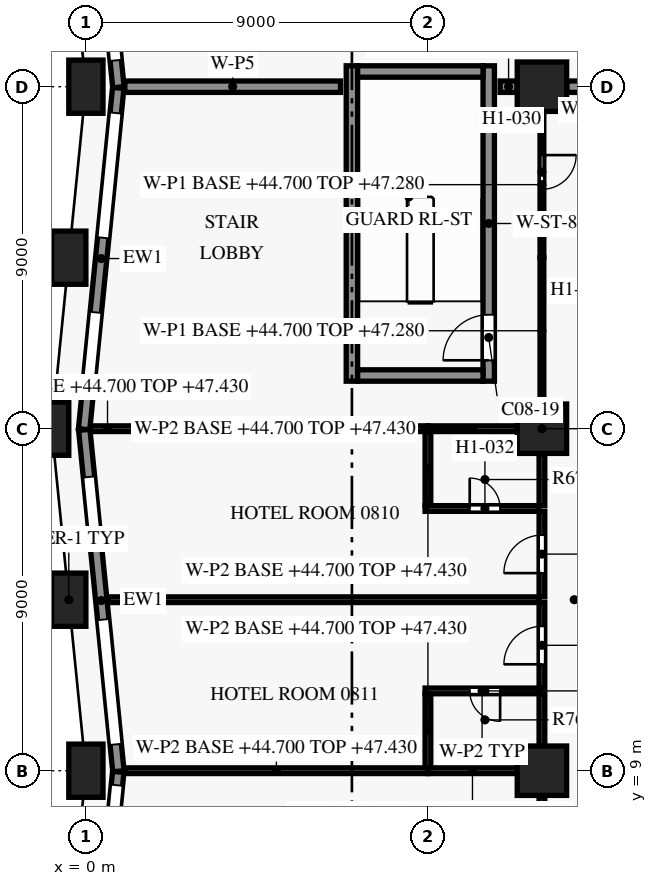
"""IFC4 building model, lengths in metres.
Left out: names, types, materials, properties, quantities, classifications, styles, units other than length and angle.
Written with IfcOpenShell. Run it as: python <this file> out.ifc"""

import sys

from ifc_helpers import new_model, si_unit, direction, frame, frame_2d, origin, origin_2d, place, context, subcontext, project, spatial, rectangle, extrude, element, fill, save


model = new_model("IFC4")
c1 = context("Model", 3, precision=1e-05, world=origin(), true_north=direction((0.0, 1.0)))
c2 = subcontext(c1, "Body", "Model", "MODEL_VIEW")
j1 = project(units=[si_unit("LENGTHUNIT", "METRE"), si_unit("PLANEANGLEUNIT", "RADIAN")], contexts=[c1])
p1 = place(None, origin())
s1 = spatial("IfcSite", under=j1, at=p1, CompositionType="ELEMENT")
p2 = place(p1, origin())
s2 = spatial("IfcBuilding", under=s1, at=p2, CompositionType="ELEMENT")
p3 = place(p2, frame((0.0, 0.0, 44.7)))
s3 = spatial("IfcBuildingStorey", under=s2, at=p3, CompositionType="ELEMENT", Elevation=44.7)
for number, where, z_axis, x_axis in (
    (1, (0.0, 27.0, 0.0), (0.0, 0.0, 1.0), (0.0, -1.0, 0.0)),
    (2, (-0.45, 22.5, 0.0), (0.0, 0.0, 1.0), (-0.1, -0.995, 0.0)),
    (3, (-0.9, 18.0, 0.0), (0.0, 0.0, 1.0), (0.0, -1.0, 0.0)),
    (4, (-0.45, 13.5, 0.0), (0.0, 0.0, 1.0), (0.1, -0.995, 0.0)),
    (5, (0.0, 9.0, 0.0), (0.0, 0.0, 1.0), (0.0, -1.0, 0.0)),
):
    element("IfcColumn", number, at=place(p3, frame(where, z_axis=z_axis, x_axis=x_axis)), inside=s3, PredefinedType="COLUMN", context=c2, shape_type="SweptSolid", body=[
        extrude(rectangle(XDim=0.9, YDim=1.4, at=origin_2d()), origin(), (0.0, 0.0, 1.0), 3.6),
    ])
for number, where, z_axis, x_axis in (
    (6, (12.0, 9.0, 0.0), (0.0, 0.0, 1.0), (1.0, 0.0, 0.0)),
    (7, (12.0, 18.0, 0.0), (0.0, 0.0, 1.0), (1.0, 0.0, 0.0)),
    (8, (12.0, 27.0, 0.0), (0.0, 0.0, 1.0), (1.0, 0.0, 0.0)),
):
    element("IfcColumn", number, at=place(p3, frame(where, z_axis=z_axis, x_axis=x_axis)), inside=s3, PredefinedType="COLUMN", context=c2, shape_type="SweptSolid", body=[
        extrude(rectangle(XDim=1.3, YDim=1.3, at=origin_2d()), origin(), (0.0, 0.0, 1.0), 3.6),
    ])
p4 = place(p3, frame((0.856, 26.985, 0.0), z_axis=(0.0, 0.0, 1.0), x_axis=(-0.099503719021, 0.99503719021, 0.0)))
e9 = element("IfcWall", 9, at=p4, inside=s3, PredefinedType="SOLIDWALL", context=c2, shape_type="SweptSolid", body=[
    extrude(rectangle(XDim=8.995, YDim=0.3, at=frame_2d((4.498, 0.0))), origin(), (0.0, 0.0, 1.0), 2.95),
])
p5 = place(p4, frame((0.711, 0.0, 0.15)))
e10 = element("IfcOpeningElement", 10, at=p5, cuts=e9, PredefinedType="OPENING", context=c2, shape_type="SweptSolid", body=[
    extrude(rectangle(XDim=3.3, YDim=2.4, at=frame_2d((1.65, 1.2))), frame((0.0, 0.16, 0.0), z_axis=(0.0, -1.0, 0.0), x_axis=(1.0, 0.0, 0.0)), (0.0, 0.0, 1.0), 0.32),
])
p6 = place(p4, frame((5.984, 0.0, 0.75)))
e11 = element("IfcOpeningElement", 11, at=p6, cuts=e9, PredefinedType="OPENING", context=c2, shape_type="SweptSolid", body=[
    extrude(rectangle(XDim=1.8, YDim=1.8, at=frame_2d((0.9, 0.9))), frame((0.0, 0.16, 0.0), z_axis=(0.0, -1.0, 0.0), x_axis=(1.0, 0.0, 0.0)), (0.0, 0.0, 1.0), 0.32),
])
p7 = place(p3, frame((-0.047, 17.985, 0.0), z_axis=(0.0, 0.0, 1.0), x_axis=(0.099522457379, 0.995035316196, 0.0)))
e12 = element("IfcWall", 12, at=p7, inside=s3, PredefinedType="SOLIDWALL", context=c2, shape_type="SweptSolid", body=[
    extrude(rectangle(XDim=9.03, YDim=0.3, at=frame_2d((4.515, 0.0))), origin(), (0.0, 0.0, 1.0), 2.95),
])
p8 = place(p7, frame((1.291, 0.0, 0.75)))
e13 = element("IfcOpeningElement", 13, at=p8, cuts=e12, PredefinedType="OPENING", context=c2, shape_type="SweptSolid", body=[
    extrude(rectangle(XDim=1.8, YDim=1.8, at=frame_2d((0.9, 0.9))), frame((0.0, 0.16, 0.0), z_axis=(0.0, -1.0, 0.0), x_axis=(1.0, 0.0, 0.0)), (0.0, 0.0, 1.0), 0.32),
])
p9 = place(p7, frame((5.064, 0.0, 0.15)))
e14 = element("IfcOpeningElement", 14, at=p9, cuts=e12, PredefinedType="OPENING", context=c2, shape_type="SweptSolid", body=[
    extrude(rectangle(XDim=3.3, YDim=2.4, at=frame_2d((1.65, 1.2))), frame((0.0, 0.16, 0.0), z_axis=(0.0, -1.0, 0.0), x_axis=(1.0, 0.0, 0.0)), (0.0, 0.0, 1.0), 0.32),
])
p10 = place(p3, frame((0.856, 8.985, 0.0), z_axis=(0.0, 0.0, 1.0), x_axis=(-0.099495688264, 0.995037993253, 0.0)))
e15 = element("IfcWall", 15, at=p10, inside=s3, PredefinedType="SOLIDWALL", context=c2, shape_type="SweptSolid", body=[
    extrude(rectangle(XDim=9.03, YDim=0.3, at=frame_2d((4.515, 0.0))), origin(), (0.0, 0.0, 1.0), 2.95),
])
p11 = place(p10, frame((0.711, 0.0, 0.15)))
e16 = element("IfcOpeningElement", 16, at=p11, cuts=e15, PredefinedType="OPENING", context=c2, shape_type="SweptSolid", body=[
    extrude(rectangle(XDim=3.3, YDim=2.4, at=frame_2d((1.65, 1.2))), frame((0.0, 0.16, 0.0), z_axis=(0.0, -1.0, 0.0), x_axis=(1.0, 0.0, 0.0)), (0.0, 0.0, 1.0), 0.32),
])
p12 = place(p10, frame((5.984, 0.0, 0.75)))
e17 = element("IfcOpeningElement", 17, at=p12, cuts=e15, PredefinedType="OPENING", context=c2, shape_type="SweptSolid", body=[
    extrude(rectangle(XDim=1.8, YDim=1.8, at=frame_2d((0.9, 0.9))), frame((0.0, 0.16, 0.0), z_axis=(0.0, -1.0, 0.0), x_axis=(1.0, 0.0, 0.0)), (0.0, 0.0, 1.0), 0.32),
])
p13 = place(p3, frame((0.473, 5.185, 0.0), z_axis=(0.0, 0.0, 1.0), x_axis=(0.099541845169, 0.995033376857, 0.0)))
e18 = element("IfcWall", 18, at=p13, inside=s3, PredefinedType="SOLIDWALL", context=c2, shape_type="SweptSolid", body=[
    extrude(rectangle(XDim=3.804, YDim=0.3, at=frame_2d((1.902, 0.0))), origin(), (0.0, 0.0, 1.0), 2.95),
])
p14 = place(p13, frame((0.15, 0.0, 0.15)))
e19 = element("IfcOpeningElement", 19, at=p14, cuts=e18, PredefinedType="OPENING", context=c2, shape_type="SweptSolid", body=[
    extrude(rectangle(XDim=3.3, YDim=2.4, at=frame_2d((1.65, 1.2))), frame((0.0, 0.16, 0.0), z_axis=(0.0, -1.0, 0.0), x_axis=(1.0, 0.0, 0.0)), (0.0, 0.0, 1.0), 0.32),
])
for number, where, z_axis, x_axis in (
    (20, (7.15, 19.4, 0.0), (0.0, 0.0, 1.0), (1.0, 0.0, 0.0)),
    (21, (7.15, 27.4, 0.0), (0.0, 0.0, 1.0), (1.0, 0.0, 0.0)),
):
    element("IfcWall", number, at=place(p3, frame(where, z_axis=z_axis, x_axis=x_axis)), inside=s3, PredefinedType="SHEAR", context=c2, shape_type="SweptSolid", body=[
        extrude(rectangle(XDim=3.3, YDim=0.3, at=frame_2d((1.65, 0.0))), origin(), (0.0, 0.0, 1.0), 3.3),
    ])
p15 = place(p3, frame((7.0, 19.25, 0.0), z_axis=(0.0, 0.0, 1.0), x_axis=(0.0, 1.0, 0.0)))
e22 = element("IfcWall", 22, at=p15, inside=s3, PredefinedType="SHEAR", context=c2, shape_type="SweptSolid", body=[
    extrude(rectangle(XDim=8.3, YDim=0.3, at=frame_2d((4.15, 0.0))), origin(), (0.0, 0.0, 1.0), 3.3),
])
p16 = place(p3, frame((10.6, 19.25, 0.0), z_axis=(0.0, 0.0, 1.0), x_axis=(0.0, 1.0, 0.0)))
e23 = element("IfcWall", 23, at=p16, inside=s3, PredefinedType="SHEAR", context=c2, shape_type="SweptSolid", body=[
    extrude(rectangle(XDim=8.3, YDim=0.3, at=frame_2d((4.15, 0.0))), origin(), (0.0, 0.0, 1.0), 3.3),
])
p17 = place(p16, frame((0.55, 0.0, 0.0)))
e24 = element("IfcOpeningElement", 24, at=p17, cuts=e23, PredefinedType="OPENING", context=c2, shape_type="SweptSolid", body=[
    extrude(rectangle(XDim=1.2, YDim=2.2, at=frame_2d((0.6, 1.1))), frame((0.0, 0.16, 0.0), z_axis=(0.0, -1.0, 0.0), x_axis=(1.0, 0.0, 0.0)), (0.0, 0.0, 1.0), 0.32),
])
p18 = place(p3, frame((12.0, 7.275, 0.0), z_axis=(0.0, 0.0, 1.0), x_axis=(0.0, 1.0, 0.0)))
e25 = element("IfcWall", 25, at=p18, inside=s3, PredefinedType="PARTITIONING", context=c2, shape_type="SweptSolid", body=[
    extrude(rectangle(XDim=1.07, YDim=0.15, at=frame_2d((0.535, 0.0))), origin(), (0.0, 0.0, 1.0), 2.58),
])
p19 = place(p3, frame((9.0, 9.0, 0.0), z_axis=(0.0, 0.0, 1.0), x_axis=(-1.0, 0.0, 0.0)))
e26 = element("IfcWall", 26, at=p19, inside=s3, PredefinedType="PARTITIONING", context=c2, shape_type="SweptSolid", body=[
    extrude(rectangle(XDim=7.975, YDim=0.15, at=frame_2d((3.988, 0.0))), origin(), (0.0, 0.0, 1.0), 2.73),
])
p20 = place(p3, frame((11.345, 9.0, 0.0), z_axis=(0.0, 0.0, 1.0), x_axis=(-1.0, 0.0, 0.0)))
e27 = element("IfcWall", 27, at=p20, inside=s3, PredefinedType="PARTITIONING", context=c2, shape_type="SweptSolid", body=[
    extrude(rectangle(XDim=2.345, YDim=0.15, at=frame_2d((1.172, 0.0))), origin(), (0.0, 0.0, 1.0), 2.73),
])
p21 = place(p3, frame((12.0, 9.655, 0.0), z_axis=(0.0, 0.0, 1.0), x_axis=(0.0, 1.0, 0.0)))
e28 = element("IfcWall", 28, at=p21, inside=s3, PredefinedType="PARTITIONING", context=c2, shape_type="SweptSolid", body=[
    extrude(rectangle(XDim=1.37, YDim=0.15, at=frame_2d((0.685, 0.0))), origin(), (0.0, 0.0, 1.0), 2.58),
])
p22 = place(p3, frame((9.0, 11.025, 0.0), z_axis=(0.0, 0.0, 1.0), x_axis=(0.0, -1.0, 0.0)))
e29 = element("IfcWall", 29, at=p22, inside=s3, PredefinedType="PARTITIONING", context=c2, shape_type="SweptSolid", body=[
    extrude(rectangle(XDim=1.95, YDim=0.15, at=frame_2d((0.975, 0.0))), origin(), (0.0, 0.0, 1.0), 2.73),
])
p23 = place(p3, frame((11.925, 11.1, 0.0), z_axis=(0.0, 0.0, 1.0), x_axis=(-1.0, 0.0, 0.0)))
e30 = element("IfcWall", 30, at=p23, inside=s3, PredefinedType="PARTITIONING", context=c2, shape_type="SweptSolid", body=[
    extrude(rectangle(XDim=3.0, YDim=0.15, at=frame_2d((1.5, 0.0))), origin(), (0.0, 0.0, 1.0), 2.58),
])
p24 = place(p23, frame((1.025, 0.0, 0.0)))
e31 = element("IfcOpeningElement", 31, at=p24, cuts=e30, PredefinedType="OPENING", context=c2, shape_type="SweptSolid", body=[
    extrude(rectangle(XDim=0.8, YDim=2.1, at=frame_2d((0.4, 1.05))), frame((0.0, 0.085, 0.0), z_axis=(0.0, -1.0, 0.0), x_axis=(1.0, 0.0, 0.0)), (0.0, 0.0, 1.0), 0.17),
])
p25 = place(p3, frame((12.0, 11.175, 0.0), z_axis=(0.0, 0.0, 1.0), x_axis=(0.0, 1.0, 0.0)))
e32 = element("IfcWall", 32, at=p25, inside=s3, PredefinedType="PARTITIONING", context=c2, shape_type="SweptSolid", body=[
    extrude(rectangle(XDim=2.25, YDim=0.15, at=frame_2d((1.125, 0.0))), origin(), (0.0, 0.0, 1.0), 2.58),
])
p26 = place(p25, frame((0.625, 0.0, 0.0)))
e33 = element("IfcOpeningElement", 33, at=p26, cuts=e32, PredefinedType="OPENING", context=c2, shape_type="SweptSolid", body=[
    extrude(rectangle(XDim=1.0, YDim=2.1, at=frame_2d((0.5, 1.05))), frame((0.0, 0.085, 0.0), z_axis=(0.0, -1.0, 0.0), x_axis=(1.0, 0.0, 0.0)), (0.0, 0.0, 1.0), 0.17),
])
p27 = place(p3, frame((11.925, 13.5, 0.0), z_axis=(0.0, 0.0, 1.0), x_axis=(-1.0, 0.0, 0.0)))
e34 = element("IfcWall", 34, at=p27, inside=s3, PredefinedType="PARTITIONING", context=c2, shape_type="SweptSolid", body=[
    extrude(rectangle(XDim=11.35, YDim=0.15, at=frame_2d((5.675, 0.0))), origin(), (0.0, 0.0, 1.0), 2.58),
])
p28 = place(p3, frame((12.0, 13.575, 0.0), z_axis=(0.0, 0.0, 1.0), x_axis=(0.0, 1.0, 0.0)))
e35 = element("IfcWall", 35, at=p28, inside=s3, PredefinedType="PARTITIONING", context=c2, shape_type="SweptSolid", body=[
    extrude(rectangle(XDim=2.25, YDim=0.15, at=frame_2d((1.125, 0.0))), origin(), (0.0, 0.0, 1.0), 2.58),
])
p29 = place(p28, frame((0.625, 0.0, 0.0)))
e36 = element("IfcOpeningElement", 36, at=p29, cuts=e35, PredefinedType="OPENING", context=c2, shape_type="SweptSolid", body=[
    extrude(rectangle(XDim=1.0, YDim=2.1, at=frame_2d((0.5, 1.05))), frame((0.0, 0.085, 0.0), z_axis=(0.0, -1.0, 0.0), x_axis=(1.0, 0.0, 0.0)), (0.0, 0.0, 1.0), 0.17),
])
p30 = place(p3, frame((8.925, 15.9, 0.0), z_axis=(0.0, 0.0, 1.0), x_axis=(1.0, 0.0, 0.0)))
e37 = element("IfcWall", 37, at=p30, inside=s3, PredefinedType="PARTITIONING", context=c2, shape_type="SweptSolid", body=[
    extrude(rectangle(XDim=3.0, YDim=0.15, at=frame_2d((1.5, 0.0))), origin(), (0.0, 0.0, 1.0), 2.58),
])
p31 = place(p30, frame((1.175, 0.0, 0.0)))
e38 = element("IfcOpeningElement", 38, at=p31, cuts=e37, PredefinedType="OPENING", context=c2, shape_type="SweptSolid", body=[
    extrude(rectangle(XDim=0.8, YDim=2.1, at=frame_2d((0.4, 1.05))), frame((0.0, 0.085, 0.0), z_axis=(0.0, -1.0, 0.0), x_axis=(1.0, 0.0, 0.0)), (0.0, 0.0, 1.0), 0.17),
])
p32 = place(p3, frame((12.0, 15.975, 0.0), z_axis=(0.0, 0.0, 1.0), x_axis=(0.0, 1.0, 0.0)))
e39 = element("IfcWall", 39, at=p32, inside=s3, PredefinedType="PARTITIONING", context=c2, shape_type="SweptSolid", body=[
    extrude(rectangle(XDim=1.37, YDim=0.15, at=frame_2d((0.685, 0.0))), origin(), (0.0, 0.0, 1.0), 2.58),
])
p33 = place(p3, frame((9.0, 17.925, 0.0), z_axis=(0.0, 0.0, 1.0), x_axis=(0.0, -1.0, 0.0)))
e40 = element("IfcWall", 40, at=p33, inside=s3, PredefinedType="PARTITIONING", context=c2, shape_type="SweptSolid", body=[
    extrude(rectangle(XDim=1.95, YDim=0.15, at=frame_2d((0.975, 0.0))), origin(), (0.0, 0.0, 1.0), 2.73),
])
p34 = place(p3, frame((9.0, 18.0, 0.0), z_axis=(0.0, 0.0, 1.0), x_axis=(-1.0, 0.0, 0.0)))
e41 = element("IfcWall", 41, at=p34, inside=s3, PredefinedType="PARTITIONING", context=c2, shape_type="SweptSolid", body=[
    extrude(rectangle(XDim=8.875, YDim=0.15, at=frame_2d((4.438, 0.0))), origin(), (0.0, 0.0, 1.0), 2.73),
])
p35 = place(p3, frame((11.345, 18.0, 0.0), z_axis=(0.0, 0.0, 1.0), x_axis=(-1.0, 0.0, 0.0)))
e42 = element("IfcWall", 42, at=p35, inside=s3, PredefinedType="PARTITIONING", context=c2, shape_type="SweptSolid", body=[
    extrude(rectangle(XDim=2.345, YDim=0.15, at=frame_2d((1.172, 0.0))), origin(), (0.0, 0.0, 1.0), 2.73),
])
p36 = place(p3, frame((12.0, 22.5, 0.0), z_axis=(0.0, 0.0, 1.0), x_axis=(0.0, -1.0, 0.0)))
e43 = element("IfcWall", 43, at=p36, inside=s3, PredefinedType="PARTITIONING", context=c2, shape_type="SweptSolid", body=[
    extrude(rectangle(XDim=3.845, YDim=0.1, at=frame_2d((1.922, 0.0))), origin(), (0.0, 0.0, 1.0), 2.58),
])
p37 = place(p3, frame((12.0, 26.345, 0.0), z_axis=(0.0, 0.0, 1.0), x_axis=(0.0, -1.0, 0.0)))
e44 = element("IfcWall", 44, at=p37, inside=s3, PredefinedType="PARTITIONING", context=c2, shape_type="SweptSolid", body=[
    extrude(rectangle(XDim=3.845, YDim=0.1, at=frame_2d((1.922, 0.0))), origin(), (0.0, 0.0, 1.0), 2.58),
])
p38 = place(p37, frame((1.145, 0.0, 0.0)))
e45 = element("IfcOpeningElement", 45, at=p38, cuts=e44, PredefinedType="OPENING", context=c2, shape_type="SweptSolid", body=[
    extrude(rectangle(XDim=0.9, YDim=2.1, at=frame_2d((0.45, 1.05))), frame((0.0, 0.06, 0.0), z_axis=(0.0, -1.0, 0.0), x_axis=(1.0, 0.0, 0.0)), (0.0, 0.0, 1.0), 0.12),
])
p39 = place(p3, frame((6.7, 27.0, 0.0), z_axis=(0.0, 0.0, 1.0), x_axis=(-1.0, 0.0, 0.0)))
e46 = element("IfcWall", 46, at=p39, inside=s3, PredefinedType="PARTITIONING", context=c2, shape_type="SweptSolid", body=[
    extrude(rectangle(XDim=5.675, YDim=0.3, at=frame_2d((2.837, 0.0))), origin(), (0.0, 0.0, 1.0), 2.58),
])
p40 = place(p3, frame((11.345, 27.0, 0.0), z_axis=(0.0, 0.0, 1.0), x_axis=(-1.0, 0.0, 0.0)))
e47 = element("IfcWall", 47, at=p40, inside=s3, PredefinedType="PARTITIONING", context=c2, shape_type="SweptSolid", body=[
    extrude(rectangle(XDim=0.445, YDim=0.3, at=frame_2d((0.223, 0.0))), origin(), (0.0, 0.0, 1.0), 3.28),
])
p41 = place(p3, frame((13.5, 27.0, 0.0), z_axis=(0.0, 0.0, 1.0), x_axis=(-1.0, 0.0, 0.0)))
e48 = element("IfcWall", 48, at=p41, inside=s3, PredefinedType="PARTITIONING", context=c2, shape_type="SweptSolid", body=[
    extrude(rectangle(XDim=0.845, YDim=0.3, at=frame_2d((0.422, 0.0))), origin(), (0.0, 0.0, 1.0), 2.58),
])
p42 = place(p5, origin())
e49 = element("IfcWindow", 49, at=p42, inside=s3, PartitioningType="SINGLE_PANEL", PredefinedType="WINDOW", context=c2, shape_type="SweptSolid", body=[
    extrude(rectangle(XDim=3.3, YDim=2.4, at=frame_2d((1.65, 1.2))), frame((0.0, 0.03, 0.0), z_axis=(0.0, -1.0, 0.0), x_axis=(1.0, 0.0, 0.0)), (0.0, 0.0, 1.0), 0.06),
])
fill(e10, e49)
p43 = place(p8, origin())
e50 = element("IfcWindow", 50, at=p43, inside=s3, PartitioningType="SINGLE_PANEL", PredefinedType="WINDOW", context=c2, shape_type="SweptSolid", body=[
    extrude(rectangle(XDim=1.8, YDim=1.8, at=frame_2d((0.9, 0.9))), frame((0.0, 0.03, 0.0), z_axis=(0.0, -1.0, 0.0), x_axis=(1.0, 0.0, 0.0)), (0.0, 0.0, 1.0), 0.06),
])
fill(e13, e50)
p44 = place(p9, origin())
e51 = element("IfcWindow", 51, at=p44, inside=s3, PartitioningType="SINGLE_PANEL", PredefinedType="WINDOW", context=c2, shape_type="SweptSolid", body=[
    extrude(rectangle(XDim=3.3, YDim=2.4, at=frame_2d((1.65, 1.2))), frame((0.0, 0.03, 0.0), z_axis=(0.0, -1.0, 0.0), x_axis=(1.0, 0.0, 0.0)), (0.0, 0.0, 1.0), 0.06),
])
fill(e14, e51)
p45 = place(p11, origin())
e52 = element("IfcWindow", 52, at=p45, inside=s3, PartitioningType="SINGLE_PANEL", PredefinedType="WINDOW", context=c2, shape_type="SweptSolid", body=[
    extrude(rectangle(XDim=3.3, YDim=2.4, at=frame_2d((1.65, 1.2))), frame((0.0, 0.03, 0.0), z_axis=(0.0, -1.0, 0.0), x_axis=(1.0, 0.0, 0.0)), (0.0, 0.0, 1.0), 0.06),
])
fill(e16, e52)
p46 = place(p12, origin())
e53 = element("IfcWindow", 53, at=p46, inside=s3, PartitioningType="SINGLE_PANEL", PredefinedType="WINDOW", context=c2, shape_type="SweptSolid", body=[
    extrude(rectangle(XDim=1.8, YDim=1.8, at=frame_2d((0.9, 0.9))), frame((0.0, 0.03, 0.0), z_axis=(0.0, -1.0, 0.0), x_axis=(1.0, 0.0, 0.0)), (0.0, 0.0, 1.0), 0.06),
])
fill(e17, e53)
p47 = place(p14, origin())
e54 = element("IfcWindow", 54, at=p47, inside=s3, PartitioningType="SINGLE_PANEL", PredefinedType="WINDOW", context=c2, shape_type="SweptSolid", body=[
    extrude(rectangle(XDim=3.3, YDim=2.4, at=frame_2d((1.65, 1.2))), frame((0.0, 0.03, 0.0), z_axis=(0.0, -1.0, 0.0), x_axis=(1.0, 0.0, 0.0)), (0.0, 0.0, 1.0), 0.06),
])
fill(e19, e54)
p48 = place(p17, origin())
e55 = element("IfcDoor", 55, at=p48, inside=s3, OperationType="SINGLE_SWING_RIGHT", PredefinedType="DOOR", context=c2, shape_type="SweptSolid", body=[
    extrude(rectangle(XDim=1.2, YDim=2.2, at=frame_2d((0.6, 1.1))), frame((0.0, 0.025, 0.0), z_axis=(0.0, -1.0, 0.0), x_axis=(1.0, 0.0, 0.0)), (0.0, 0.0, 1.0), 0.05),
])
fill(e24, e55)
p49 = place(p38, origin())
e56 = element("IfcDoor", 56, at=p49, inside=s3, OperationType="SINGLE_SWING_LEFT", PredefinedType="DOOR", context=c2, shape_type="SweptSolid", body=[
    extrude(rectangle(XDim=0.9, YDim=2.1, at=frame_2d((0.45, 1.05))), frame((0.0, 0.025, 0.0), z_axis=(0.0, -1.0, 0.0), x_axis=(1.0, 0.0, 0.0)), (0.0, 0.0, 1.0), 0.05),
])
fill(e45, e56)
p50 = place(p29, origin())
e57 = element("IfcDoor", 57, at=p50, inside=s3, OperationType="SINGLE_SWING_LEFT", PredefinedType="DOOR", context=c2, shape_type="SweptSolid", body=[
    extrude(rectangle(XDim=1.0, YDim=2.1, at=frame_2d((0.5, 1.05))), frame((0.0, 0.025, 0.0), z_axis=(0.0, -1.0, 0.0), x_axis=(1.0, 0.0, 0.0)), (0.0, 0.0, 1.0), 0.05),
])
fill(e36, e57)
p51 = place(p31, origin())
e58 = element("IfcDoor", 58, at=p51, inside=s3, OperationType="SINGLE_SWING_LEFT", PredefinedType="DOOR", context=c2, shape_type="SweptSolid", body=[
    extrude(rectangle(XDim=0.8, YDim=2.1, at=frame_2d((0.4, 1.05))), frame((0.0, 0.025, 0.0), z_axis=(0.0, -1.0, 0.0), x_axis=(1.0, 0.0, 0.0)), (0.0, 0.0, 1.0), 0.05),
])
fill(e38, e58)
p52 = place(p26, origin())
e59 = element("IfcDoor", 59, at=p52, inside=s3, OperationType="SINGLE_SWING_LEFT", PredefinedType="DOOR", context=c2, shape_type="SweptSolid", body=[
    extrude(rectangle(XDim=1.0, YDim=2.1, at=frame_2d((0.5, 1.05))), frame((0.0, 0.025, 0.0), z_axis=(0.0, -1.0, 0.0), x_axis=(1.0, 0.0, 0.0)), (0.0, 0.0, 1.0), 0.05),
])
fill(e33, e59)
p53 = place(p24, origin())
e60 = element("IfcDoor", 60, at=p53, inside=s3, OperationType="SINGLE_SWING_LEFT", PredefinedType="DOOR", context=c2, shape_type="SweptSolid", body=[
    extrude(rectangle(XDim=0.8, YDim=2.1, at=frame_2d((0.4, 1.05))), frame((0.0, 0.025, 0.0), z_axis=(0.0, -1.0, 0.0), x_axis=(1.0, 0.0, 0.0)), (0.0, 0.0, 1.0), 0.05),
])
fill(e31, e60)
save(model, sys.argv[1])
